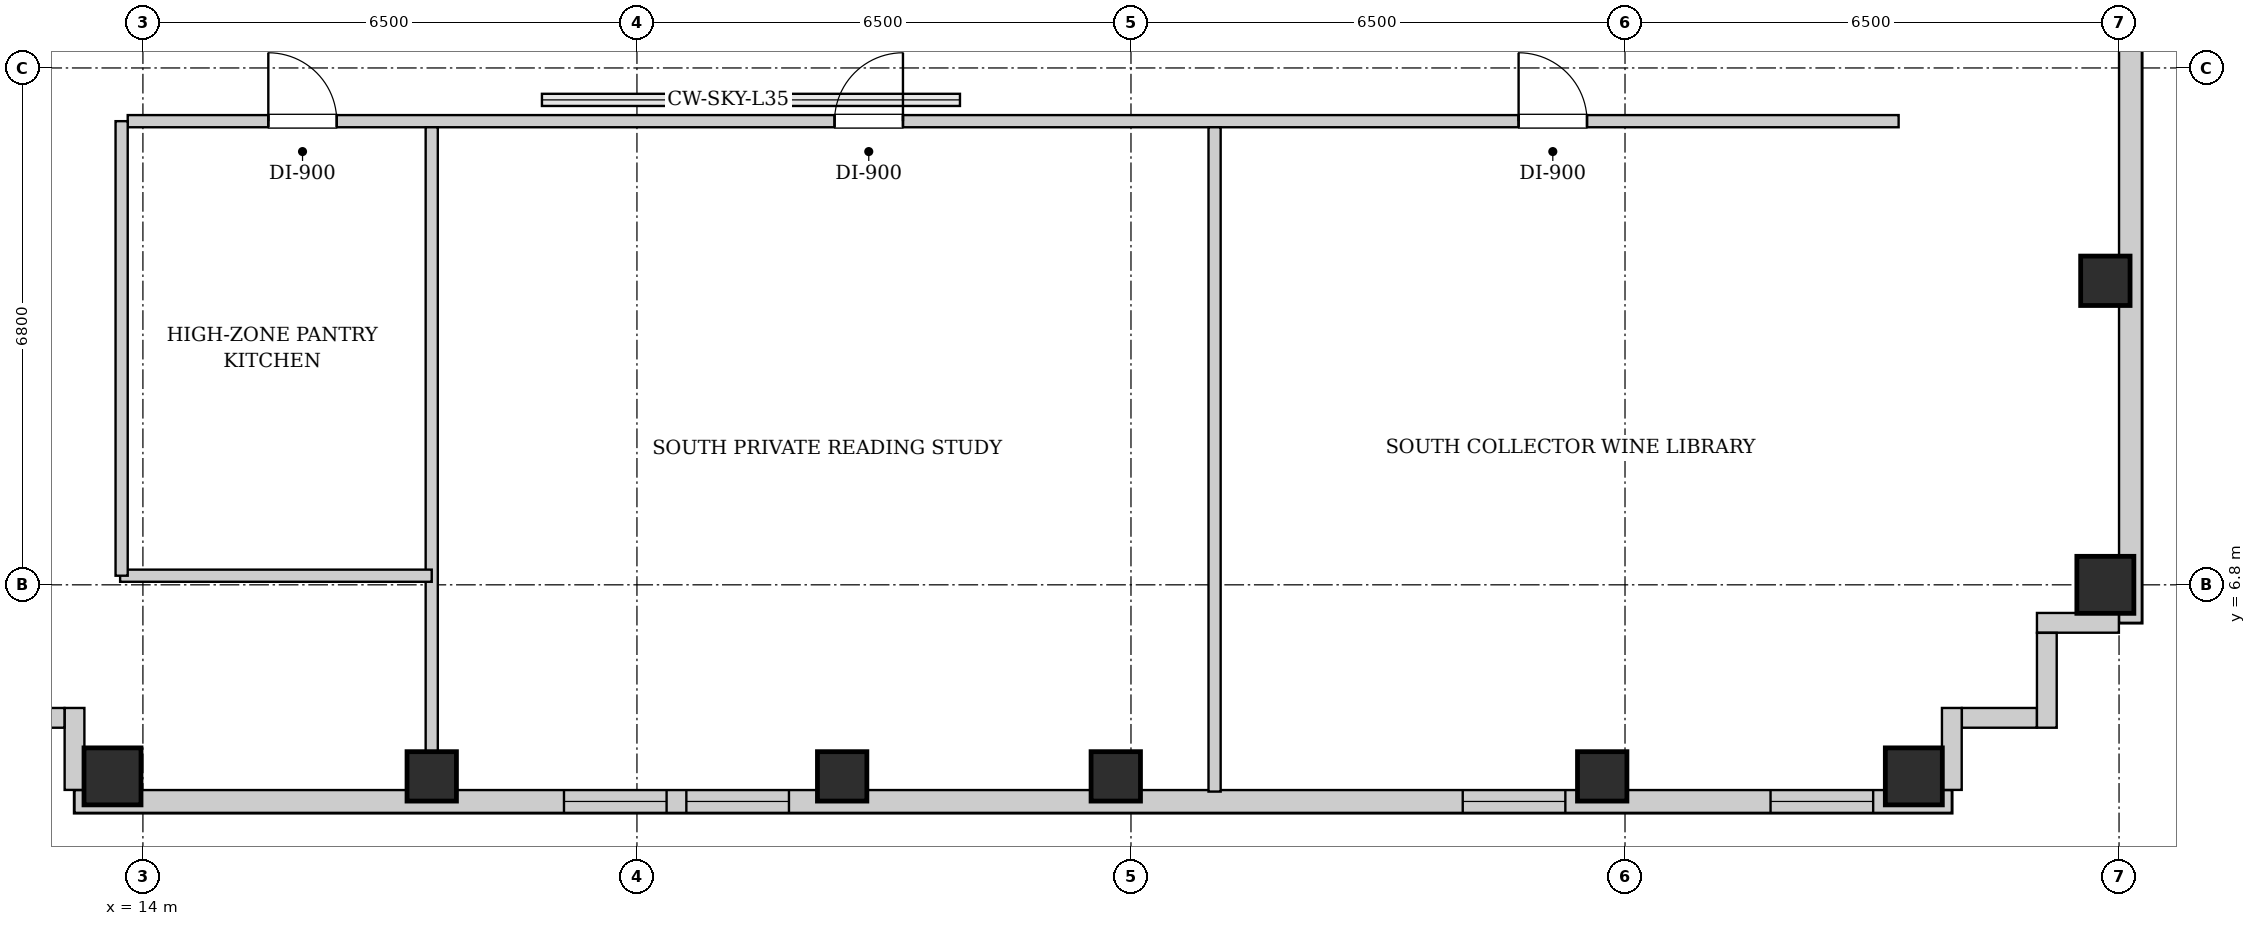
"""IFC4 building model, lengths in metres.
Left out: names, types, materials, properties, quantities, classifications, styles, units other than length and angle.
Written with IfcOpenShell. Run it as: python <this file> out.ifc"""

import sys

from ifc_helpers import new_model, si_unit, direction, frame, frame_2d, origin, origin_2d, place, context, subcontext, project, spatial, rectangle, extrude, element, fill, save


model = new_model("IFC4")
c1 = context("Model", 3, precision=1e-05, world=origin(), true_north=direction((0.0, 1.0)))
c2 = subcontext(c1, "Body", "Model", "MODEL_VIEW")
j1 = project(units=[si_unit("LENGTHUNIT", "METRE"), si_unit("PLANEANGLEUNIT", "RADIAN")], contexts=[c1])
p1 = place(None, origin())
s1 = spatial("IfcSite", under=j1, at=p1, CompositionType="ELEMENT")
p2 = place(p1, origin())
s2 = spatial("IfcBuilding", under=s1, at=p2, CompositionType="ELEMENT")
p3 = place(p2, frame((0.0, 0.0, 174.4)))
s3 = spatial("IfcBuildingStorey", under=s2, at=p3, CompositionType="ELEMENT", Elevation=174.4)
p4 = place(p3, frame((13.6, 4.28, 0.0), z_axis=(0.0, 0.0, 1.0), x_axis=(1.0, 0.0, 0.0)))
e1 = element("IfcColumn", 1, at=p4, inside=s3, PredefinedType="COLUMN", context=c2, shape_type="SweptSolid", body=[
    extrude(rectangle(XDim=0.75, YDim=0.75, at=origin_2d()), origin(), (0.0, 0.0, 1.0), 3.3),
])
for number, where, z_axis, x_axis in (
    (2, (17.8, 4.28, 0.0), (0.0, 0.0, 1.0), (1.0, 0.0, 0.0)),
    (3, (23.2, 4.28, 0.0), (0.0, 0.0, 1.0), (1.0, 0.0, 0.0)),
    (4, (26.8, 4.28, 0.0), (0.0, 0.0, 1.0), (1.0, 0.0, 0.0)),
    (5, (33.2, 4.28, 0.0), (0.0, 0.0, 1.0), (1.0, 0.0, 0.0)),
):
    element("IfcColumn", number, at=place(p3, frame(where, z_axis=z_axis, x_axis=x_axis)), inside=s3, PredefinedType="COLUMN", context=c2, shape_type="SweptSolid", body=[
        extrude(rectangle(XDim=0.65, YDim=0.65, at=origin_2d()), origin(), (0.0, 0.0, 1.0), 3.3),
    ])
for number, where, z_axis, x_axis in (
    (6, (37.3, 4.28, 0.0), (0.0, 0.0, 1.0), (1.0, 0.0, 0.0)),
    (7, (39.82, 6.8, 0.0), (0.0, 0.0, 1.0), (1.0, 0.0, 0.0)),
):
    element("IfcColumn", number, at=place(p3, frame(where, z_axis=z_axis, x_axis=x_axis)), inside=s3, PredefinedType="COLUMN", context=c2, shape_type="SweptSolid", body=[
        extrude(rectangle(XDim=0.75, YDim=0.75, at=origin_2d()), origin(), (0.0, 0.0, 1.0), 3.3),
    ])
p5 = place(p3, frame((39.82, 10.8, 0.0), z_axis=(0.0, 0.0, 1.0), x_axis=(1.0, 0.0, 0.0)))
e8 = element("IfcColumn", 8, at=p5, inside=s3, PredefinedType="COLUMN", context=c2, shape_type="SweptSolid", body=[
    extrude(rectangle(XDim=0.65, YDim=0.65, at=origin_2d()), origin(), (0.0, 0.0, 1.0), 3.3),
])
p6 = place(p3, frame((40.15, 37.7, 0.0), z_axis=(0.0, 0.0, 1.0), x_axis=(0.0, -1.0, 0.0)))
e9 = element("IfcWall", 9, at=p6, inside=s3, PredefinedType="SOLIDWALL", context=c2, shape_type="SweptSolid", body=[
    extrude(rectangle(XDim=31.4, YDim=0.3, at=frame_2d((15.7, 0.0))), origin(), (0.0, 0.0, 1.0), 3.04),
])
p7 = place(p6, frame((2.856, 0.0, 0.55)))
e10 = element("IfcOpeningElement", 10, at=p7, cuts=e9, PredefinedType="OPENING", context=c2, shape_type="SweptSolid", body=[
    extrude(rectangle(XDim=1.35, YDim=1.2, at=frame_2d((0.675, 0.6))), frame((0.0, 0.16, 0.0), z_axis=(0.0, -1.0, 0.0), x_axis=(1.0, 0.0, 0.0)), (0.0, 0.0, 1.0), 0.32),
])
p8 = place(p6, frame((1.035, 0.0, 0.55)))
e11 = element("IfcOpeningElement", 11, at=p8, cuts=e9, PredefinedType="OPENING", context=c2, shape_type="SweptSolid", body=[
    extrude(rectangle(XDim=1.35, YDim=1.2, at=frame_2d((0.675, 0.6))), frame((0.0, 0.16, 0.0), z_axis=(0.0, -1.0, 0.0), x_axis=(1.0, 0.0, 0.0)), (0.0, 0.0, 1.0), 0.32),
])
p9 = place(p6, frame((11.85, 0.0, 0.55)))
e12 = element("IfcOpeningElement", 12, at=p9, cuts=e9, PredefinedType="OPENING", context=c2, shape_type="SweptSolid", body=[
    extrude(rectangle(XDim=1.35, YDim=1.2, at=frame_2d((0.675, 0.6))), frame((0.0, 0.16, 0.0), z_axis=(0.0, -1.0, 0.0), x_axis=(1.0, 0.0, 0.0)), (0.0, 0.0, 1.0), 0.32),
])
p10 = place(p6, frame((9.214, 0.0, 0.55)))
e13 = element("IfcOpeningElement", 13, at=p10, cuts=e9, PredefinedType="OPENING", context=c2, shape_type="SweptSolid", body=[
    extrude(rectangle(XDim=1.35, YDim=1.2, at=frame_2d((0.675, 0.6))), frame((0.0, 0.16, 0.0), z_axis=(0.0, -1.0, 0.0), x_axis=(1.0, 0.0, 0.0)), (0.0, 0.0, 1.0), 0.32),
])
p11 = place(p3, frame((37.8, 3.95, 0.0), z_axis=(0.0, 0.0, 1.0), x_axis=(-1.0, 0.0, 0.0)))
e14 = element("IfcWall", 14, at=p11, inside=s3, PredefinedType="SOLIDWALL", context=c2, shape_type="SweptSolid", body=[
    extrude(rectangle(XDim=24.7, YDim=0.3, at=frame_2d((12.35, 0.0))), origin(), (0.0, 0.0, 1.0), 3.04),
])
p12 = place(p11, frame((15.3, 0.0, 0.55)))
e15 = element("IfcOpeningElement", 15, at=p12, cuts=e14, PredefinedType="OPENING", context=c2, shape_type="SweptSolid", body=[
    extrude(rectangle(XDim=1.35, YDim=1.2, at=frame_2d((0.675, 0.6))), frame((0.0, 0.16, 0.0), z_axis=(0.0, -1.0, 0.0), x_axis=(1.0, 0.0, 0.0)), (0.0, 0.0, 1.0), 0.32),
])
p13 = place(p11, frame((16.91, 0.0, 0.55)))
e16 = element("IfcOpeningElement", 16, at=p13, cuts=e14, PredefinedType="OPENING", context=c2, shape_type="SweptSolid", body=[
    extrude(rectangle(XDim=1.35, YDim=1.2, at=frame_2d((0.675, 0.6))), frame((0.0, 0.16, 0.0), z_axis=(0.0, -1.0, 0.0), x_axis=(1.0, 0.0, 0.0)), (0.0, 0.0, 1.0), 0.32),
])
p14 = place(p11, frame((5.085, 0.0, 0.55)))
e17 = element("IfcOpeningElement", 17, at=p14, cuts=e14, PredefinedType="OPENING", context=c2, shape_type="SweptSolid", body=[
    extrude(rectangle(XDim=1.35, YDim=1.2, at=frame_2d((0.675, 0.6))), frame((0.0, 0.16, 0.0), z_axis=(0.0, -1.0, 0.0), x_axis=(1.0, 0.0, 0.0)), (0.0, 0.0, 1.0), 0.32),
])
p15 = place(p11, frame((1.035, 0.0, 0.55)))
e18 = element("IfcOpeningElement", 18, at=p15, cuts=e14, PredefinedType="OPENING", context=c2, shape_type="SweptSolid", body=[
    extrude(rectangle(XDim=1.35, YDim=1.2, at=frame_2d((0.675, 0.6))), frame((0.0, 0.16, 0.0), z_axis=(0.0, -1.0, 0.0), x_axis=(1.0, 0.0, 0.0)), (0.0, 0.0, 1.0), 0.32),
])
p16 = place(p3, frame((39.998, 6.3, 0.0), z_axis=(0.0, 0.0, 1.0), x_axis=(-1.0, 0.0, 0.0)))
e19 = element("IfcWall", 19, at=p16, inside=s3, PredefinedType="SOLIDWALL", context=c2, shape_type="SweptSolid", body=[
    extrude(rectangle(XDim=1.078, YDim=0.26, at=frame_2d((0.539, 0.0))), origin(), (0.0, 0.0, 1.0), 3.04),
])
p17 = place(p3, frame((39.05, 6.168, 0.0), z_axis=(0.0, 0.0, 1.0), x_axis=(0.0, -1.0, 0.0)))
e20 = element("IfcWall", 20, at=p17, inside=s3, PredefinedType="SOLIDWALL", context=c2, shape_type="SweptSolid", body=[
    extrude(rectangle(XDim=1.248, YDim=0.26, at=frame_2d((0.624, 0.0))), origin(), (0.0, 0.0, 1.0), 3.04),
])
p18 = place(p3, frame((38.918, 5.05, 0.0), z_axis=(0.0, 0.0, 1.0), x_axis=(-1.0, 0.0, 0.0)))
e21 = element("IfcWall", 21, at=p18, inside=s3, PredefinedType="SOLIDWALL", context=c2, shape_type="SweptSolid", body=[
    extrude(rectangle(XDim=0.986, YDim=0.26, at=frame_2d((0.493, 0.0))), origin(), (0.0, 0.0, 1.0), 3.04),
])
for number, where, z_axis, x_axis in (
    (22, (37.8, 5.18, 0.0), (0.0, 0.0, 1.0), (0.0, -1.0, 0.0)),
    (23, (13.1, 4.102, 0.0), (0.0, 0.0, 1.0), (0.0, 1.0, 0.0)),
):
    element("IfcWall", number, at=place(p3, frame(where, z_axis=z_axis, x_axis=x_axis)), inside=s3, PredefinedType="SOLIDWALL", context=c2, shape_type="SweptSolid", body=[
        extrude(rectangle(XDim=1.078, YDim=0.26, at=frame_2d((0.539, 0.0))), origin(), (0.0, 0.0, 1.0), 3.04),
    ])
p19 = place(p3, frame((12.968, 5.05, 0.0), z_axis=(0.0, 0.0, 1.0), x_axis=(-1.0, 0.0, 0.0)))
e24 = element("IfcWall", 24, at=p19, inside=s3, PredefinedType="SOLIDWALL", context=c2, shape_type="SweptSolid", body=[
    extrude(rectangle(XDim=1.248, YDim=0.26, at=frame_2d((0.624, 0.0))), origin(), (0.0, 0.0, 1.0), 3.04),
])
p20 = place(p3, frame((13.8, 12.9, 0.0), z_axis=(0.0, 0.0, 1.0), x_axis=(1.0, 0.0, 0.0)))
e25 = element("IfcWall", 25, at=p20, inside=s3, PredefinedType="PARTITIONING", context=c2, shape_type="SweptSolid", body=[
    extrude(rectangle(XDim=23.3, YDim=0.16, at=frame_2d((11.65, 0.0))), origin(), (0.0, 0.0, 1.0), 3.04),
])
p21 = place(p20, frame((1.85, 0.0, 0.0)))
e26 = element("IfcOpeningElement", 26, at=p21, cuts=e25, PredefinedType="OPENING", context=c2, shape_type="SweptSolid", body=[
    extrude(rectangle(XDim=0.9, YDim=2.05, at=frame_2d((0.45, 1.025))), frame((0.0, 0.09, 0.0), z_axis=(0.0, -1.0, 0.0), x_axis=(1.0, 0.0, 0.0)), (0.0, 0.0, 1.0), 0.18),
])
p22 = place(p20, frame((9.3, 0.0, 0.0)))
e27 = element("IfcOpeningElement", 27, at=p22, cuts=e25, PredefinedType="OPENING", context=c2, shape_type="SweptSolid", body=[
    extrude(rectangle(XDim=0.9, YDim=2.05, at=frame_2d((0.45, 1.025))), frame((0.0, 0.09, 0.0), z_axis=(0.0, -1.0, 0.0), x_axis=(1.0, 0.0, 0.0)), (0.0, 0.0, 1.0), 0.18),
])
p23 = place(p20, frame((18.3, 0.0, 0.0)))
e28 = element("IfcOpeningElement", 28, at=p23, cuts=e25, PredefinedType="OPENING", context=c2, shape_type="SweptSolid", body=[
    extrude(rectangle(XDim=0.9, YDim=2.05, at=frame_2d((0.45, 1.025))), frame((0.0, 0.09, 0.0), z_axis=(0.0, -1.0, 0.0), x_axis=(1.0, 0.0, 0.0)), (0.0, 0.0, 1.0), 0.18),
])
p24 = place(p3, frame((17.8, 4.08, 0.0), z_axis=(0.0, 0.0, 1.0), x_axis=(0.0, 1.0, 0.0)))
e29 = element("IfcWall", 29, at=p24, inside=s3, PredefinedType="PARTITIONING", context=c2, shape_type="SweptSolid", body=[
    extrude(rectangle(XDim=8.74, YDim=0.16, at=frame_2d((4.37, 0.0))), origin(), (0.0, 0.0, 1.0), 2.556),
])
p25 = place(p3, frame((28.1, 4.08, 0.0), z_axis=(0.0, 0.0, 1.0), x_axis=(0.0, 1.0, 0.0)))
e30 = element("IfcWall", 30, at=p25, inside=s3, PredefinedType="PARTITIONING", context=c2, shape_type="SweptSolid", body=[
    extrude(rectangle(XDim=8.74, YDim=0.16, at=frame_2d((4.37, 0.0))), origin(), (0.0, 0.0, 1.0), 3.04),
])
p26 = place(p3, frame((13.7, 6.92, 0.0), z_axis=(0.0, 0.0, 1.0), x_axis=(1.0, 0.0, 0.0)))
e31 = element("IfcWall", 31, at=p26, inside=s3, PredefinedType="PARTITIONING", context=c2, shape_type="SweptSolid", body=[
    extrude(rectangle(XDim=4.1, YDim=0.16, at=frame_2d((2.05, 0.0))), origin(), (0.0, 0.0, 1.0), 3.04),
])
p27 = place(p3, frame((13.72, 6.92, 0.0), z_axis=(0.0, 0.0, 1.0), x_axis=(0.0, 1.0, 0.0)))
e32 = element("IfcWall", 32, at=p27, inside=s3, PredefinedType="PARTITIONING", context=c2, shape_type="SweptSolid", body=[
    extrude(rectangle(XDim=5.98, YDim=0.16, at=frame_2d((2.99, 0.0))), origin(), (0.0, 0.0, 1.0), 3.04),
])
p28 = place(p21, origin())
e33 = element("IfcDoor", 33, at=p28, inside=s3, OperationType="SINGLE_SWING_LEFT", PredefinedType="DOOR", context=c2, shape_type="SweptSolid", body=[
    extrude(rectangle(XDim=0.9, YDim=2.05, at=frame_2d((0.45, 1.025))), frame((0.0, 0.025, 0.0), z_axis=(0.0, -1.0, 0.0), x_axis=(1.0, 0.0, 0.0)), (0.0, 0.0, 1.0), 0.05),
])
fill(e26, e33)
p29 = place(p22, origin())
e34 = element("IfcDoor", 34, at=p29, inside=s3, OperationType="SINGLE_SWING_RIGHT", PredefinedType="DOOR", context=c2, shape_type="SweptSolid", body=[
    extrude(rectangle(XDim=0.9, YDim=2.05, at=frame_2d((0.45, 1.025))), frame((0.0, 0.025, 0.0), z_axis=(0.0, -1.0, 0.0), x_axis=(1.0, 0.0, 0.0)), (0.0, 0.0, 1.0), 0.05),
])
fill(e27, e34)
p30 = place(p23, origin())
e35 = element("IfcDoor", 35, at=p30, inside=s3, OperationType="SINGLE_SWING_LEFT", PredefinedType="DOOR", context=c2, shape_type="SweptSolid", body=[
    extrude(rectangle(XDim=0.9, YDim=2.05, at=frame_2d((0.45, 1.025))), frame((0.0, 0.025, 0.0), z_axis=(0.0, -1.0, 0.0), x_axis=(1.0, 0.0, 0.0)), (0.0, 0.0, 1.0), 0.05),
])
fill(e28, e35)
p31 = place(p12, origin())
e36 = element("IfcWindow", 36, at=p31, inside=s3, PartitioningType="SINGLE_PANEL", PredefinedType="WINDOW", context=c2, shape_type="SweptSolid", body=[
    extrude(rectangle(XDim=1.35, YDim=1.2, at=frame_2d((0.675, 0.6))), frame((0.0, 0.03, 0.0), z_axis=(0.0, -1.0, 0.0), x_axis=(1.0, 0.0, 0.0)), (0.0, 0.0, 1.0), 0.06),
])
fill(e15, e36)
p32 = place(p13, origin())
e37 = element("IfcWindow", 37, at=p32, inside=s3, PartitioningType="SINGLE_PANEL", PredefinedType="WINDOW", context=c2, shape_type="SweptSolid", body=[
    extrude(rectangle(XDim=1.35, YDim=1.2, at=frame_2d((0.675, 0.6))), frame((0.0, 0.03, 0.0), z_axis=(0.0, -1.0, 0.0), x_axis=(1.0, 0.0, 0.0)), (0.0, 0.0, 1.0), 0.06),
])
fill(e16, e37)
p33 = place(p14, origin())
e38 = element("IfcWindow", 38, at=p33, inside=s3, PartitioningType="SINGLE_PANEL", PredefinedType="WINDOW", context=c2, shape_type="SweptSolid", body=[
    extrude(rectangle(XDim=1.35, YDim=1.2, at=frame_2d((0.675, 0.6))), frame((0.0, 0.03, 0.0), z_axis=(0.0, -1.0, 0.0), x_axis=(1.0, 0.0, 0.0)), (0.0, 0.0, 1.0), 0.06),
])
fill(e17, e38)
p34 = place(p15, origin())
e39 = element("IfcWindow", 39, at=p34, inside=s3, PartitioningType="SINGLE_PANEL", PredefinedType="WINDOW", context=c2, shape_type="SweptSolid", body=[
    extrude(rectangle(XDim=1.35, YDim=1.2, at=frame_2d((0.675, 0.6))), frame((0.0, 0.03, 0.0), z_axis=(0.0, -1.0, 0.0), x_axis=(1.0, 0.0, 0.0)), (0.0, 0.0, 1.0), 0.06),
])
fill(e18, e39)
save(model, sys.argv[1])
